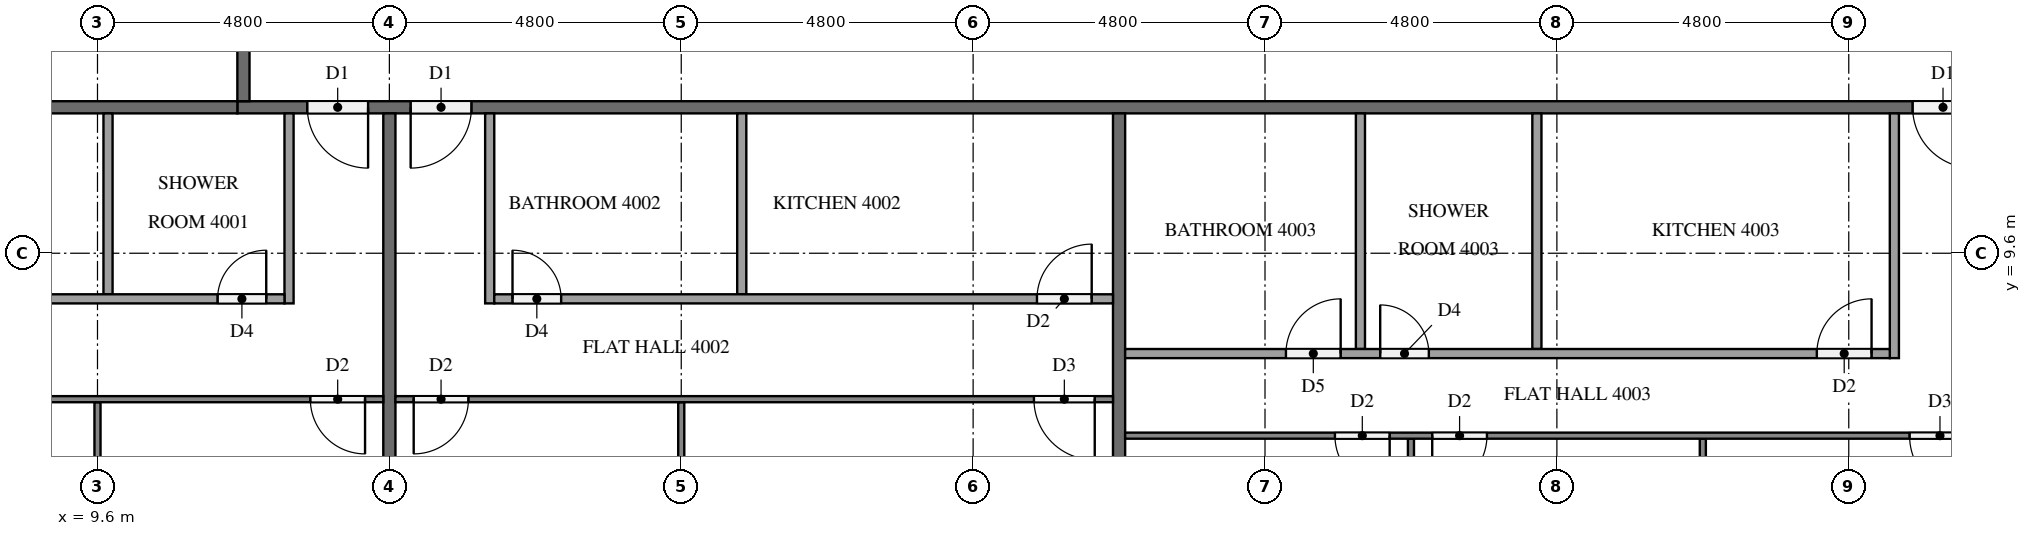
"""IFC4 building model, lengths in metres.
Left out: names, types, materials, properties, quantities, classifications, styles, units other than length and angle.
Written with IfcOpenShell. Run it as: python <this file> out.ifc"""

import sys

from ifc_helpers import new_model, si_unit, direction, frame, frame_2d, origin, place, context, subcontext, project, spatial, rectangle, extrude, element, fill, save


model = new_model("IFC4")
c1 = context("Model", 3, precision=1e-05, world=origin(), true_north=direction((0.0, 1.0)))
c2 = subcontext(c1, "Body", "Model", "MODEL_VIEW")
j1 = project(units=[si_unit("LENGTHUNIT", "METRE"), si_unit("PLANEANGLEUNIT", "RADIAN")], contexts=[c1])
p1 = place(None, origin())
s1 = spatial("IfcSite", under=j1, at=p1, CompositionType="ELEMENT")
p2 = place(p1, origin())
s2 = spatial("IfcBuilding", under=s1, at=p2, CompositionType="ELEMENT")
p3 = place(p2, frame((0.0, 0.0, 156.0)))
s3 = spatial("IfcBuildingStorey", under=s2, at=p3, CompositionType="ELEMENT", Elevation=156.0)
p4 = place(p3, frame((50.5, 12.0, 0.0), z_axis=(0.0, 0.0, 1.0), x_axis=(-1.0, 0.0, 0.0)))
e1 = element("IfcWall", 1, at=p4, inside=s3, PredefinedType="PARTITIONING", context=c2, shape_type="SweptSolid", body=[
    extrude(rectangle(XDim=38.6, YDim=0.2, at=frame_2d((19.3, 0.0))), origin(), (0.0, 0.0, 1.0), 3.2),
])
p5 = place(p4, frame((36.45, 0.0, 0.0)))
e2 = element("IfcOpeningElement", 2, at=p5, cuts=e1, PredefinedType="OPENING", context=c2, shape_type="SweptSolid", body=[
    extrude(rectangle(XDim=1.0, YDim=2.1, at=frame_2d((0.5, 1.05))), frame((0.0, 0.11, 0.0), z_axis=(0.0, -1.0, 0.0), x_axis=(1.0, 0.0, 0.0)), (0.0, 0.0, 1.0), 0.22),
])
p6 = place(p4, frame((34.75, 0.0, 0.0)))
e3 = element("IfcOpeningElement", 3, at=p6, cuts=e1, PredefinedType="OPENING", context=c2, shape_type="SweptSolid", body=[
    extrude(rectangle(XDim=1.0, YDim=2.1, at=frame_2d((0.5, 1.05))), frame((0.0, 0.11, 0.0), z_axis=(0.0, -1.0, 0.0), x_axis=(1.0, 0.0, 0.0)), (0.0, 0.0, 1.0), 0.22),
])
p7 = place(p4, frame((10.05, 0.0, 0.0)))
e4 = element("IfcOpeningElement", 4, at=p7, cuts=e1, PredefinedType="OPENING", context=c2, shape_type="SweptSolid", body=[
    extrude(rectangle(XDim=1.0, YDim=2.1, at=frame_2d((0.5, 1.05))), frame((0.0, 0.11, 0.0), z_axis=(0.0, -1.0, 0.0), x_axis=(1.0, 0.0, 0.0)), (0.0, 0.0, 1.0), 0.22),
])
p8 = place(p4, frame((8.35, 0.0, 0.0)))
e5 = element("IfcOpeningElement", 5, at=p8, cuts=e1, PredefinedType="OPENING", context=c2, shape_type="SweptSolid", body=[
    extrude(rectangle(XDim=1.0, YDim=2.1, at=frame_2d((0.5, 1.05))), frame((0.0, 0.11, 0.0), z_axis=(0.0, -1.0, 0.0), x_axis=(1.0, 0.0, 0.0)), (0.0, 0.0, 1.0), 0.22),
])
p9 = place(p3, frame((12.0, 12.1, 0.0), z_axis=(0.0, 0.0, 1.0), x_axis=(0.0, 1.0, 0.0)))
e6 = element("IfcWall", 6, at=p9, inside=s3, PredefinedType="PARTITIONING", context=c2, shape_type="SweptSolid", body=[
    extrude(rectangle(XDim=28.6, YDim=0.2, at=frame_2d((14.3, 0.0))), origin(), (0.0, 0.0, 1.0), 3.2),
])
p10 = place(p9, frame((27.35, 0.0, 0.0)))
e7 = element("IfcOpeningElement", 7, at=p10, cuts=e6, PredefinedType="OPENING", context=c2, shape_type="SweptSolid", body=[
    extrude(rectangle(XDim=1.0, YDim=2.1, at=frame_2d((0.5, 1.05))), frame((0.0, 0.11, 0.0), z_axis=(0.0, -1.0, 0.0), x_axis=(1.0, 0.0, 0.0)), (0.0, 0.0, 1.0), 0.22),
])
p11 = place(p9, frame((20.15, 0.0, 0.0)))
e8 = element("IfcOpeningElement", 8, at=p11, cuts=e6, PredefinedType="OPENING", context=c2, shape_type="SweptSolid", body=[
    extrude(rectangle(XDim=1.0, YDim=2.1, at=frame_2d((0.5, 1.05))), frame((0.0, 0.11, 0.0), z_axis=(0.0, -1.0, 0.0), x_axis=(1.0, 0.0, 0.0)), (0.0, 0.0, 1.0), 0.22),
])
p12 = place(p9, frame((10.55, 0.0, 0.0)))
e9 = element("IfcOpeningElement", 9, at=p12, cuts=e6, PredefinedType="OPENING", context=c2, shape_type="SweptSolid", body=[
    extrude(rectangle(XDim=1.0, YDim=2.1, at=frame_2d((0.5, 1.05))), frame((0.0, 0.11, 0.0), z_axis=(0.0, -1.0, 0.0), x_axis=(1.0, 0.0, 0.0)), (0.0, 0.0, 1.0), 0.22),
])
p13 = place(p3, frame((14.4, 11.9, 0.0), z_axis=(0.0, 0.0, 1.0), x_axis=(0.0, -1.0, 0.0)))
e10 = element("IfcWall", 10, at=p13, inside=s3, PredefinedType="PARTITIONING", context=c2, shape_type="SweptSolid", body=[
    extrude(rectangle(XDim=11.525, YDim=0.2, at=frame_2d((5.762, 0.0))), origin(), (0.0, 0.0, 1.0), 3.2),
])
for number, where, z_axis, x_axis in (
    (11, (0.1, 12.0, 0.0), (0.0, 0.0, 1.0), (1.0, 0.0, 0.0)),
    (12, (26.4, 11.9, 0.0), (0.0, 0.0, 1.0), (0.0, -1.0, 0.0)),
):
    element("IfcWall", number, at=place(p3, frame(where, z_axis=z_axis, x_axis=x_axis)), inside=s3, PredefinedType="PARTITIONING", context=c2, shape_type="SweptSolid", body=[
        extrude(rectangle(XDim=11.8, YDim=0.2, at=frame_2d((5.9, 0.0))), origin(), (0.0, 0.0, 1.0), 3.2),
    ])
p14 = place(p3, frame((9.6, 7.15, 0.0), z_axis=(0.0, 0.0, 1.0), x_axis=(0.0, -1.0, 0.0)))
e13 = element("IfcWall", 13, at=p14, inside=s3, PredefinedType="PARTITIONING", context=c2, shape_type="SweptSolid", body=[
    extrude(rectangle(XDim=7.05, YDim=0.1, at=frame_2d((3.525, 0.0))), origin(), (0.0, 0.0, 1.0), 3.2),
])
p15 = place(p3, frame((14.3, 7.2, 0.0), z_axis=(0.0, 0.0, 1.0), x_axis=(-1.0, 0.0, 0.0)))
e14 = element("IfcWall", 14, at=p15, inside=s3, PredefinedType="PARTITIONING", context=c2, shape_type="SweptSolid", body=[
    extrude(rectangle(XDim=14.2, YDim=0.1, at=frame_2d((7.1, 0.0))), origin(), (0.0, 0.0, 1.0), 3.2),
])
p16 = place(p15, frame((0.3, 0.0, 0.0)))
e15 = element("IfcOpeningElement", 15, at=p16, cuts=e14, PredefinedType="OPENING", context=c2, shape_type="SweptSolid", body=[
    extrude(rectangle(XDim=0.9, YDim=2.1, at=frame_2d((0.45, 1.05))), frame((0.0, 0.06, 0.0), z_axis=(0.0, -1.0, 0.0), x_axis=(1.0, 0.0, 0.0)), (0.0, 0.0, 1.0), 0.12),
])
p17 = place(p15, frame((8.25, 0.0, 0.0)))
e16 = element("IfcOpeningElement", 16, at=p17, cuts=e14, PredefinedType="OPENING", context=c2, shape_type="SweptSolid", body=[
    extrude(rectangle(XDim=0.9, YDim=2.1, at=frame_2d((0.45, 1.05))), frame((0.0, 0.06, 0.0), z_axis=(0.0, -1.0, 0.0), x_axis=(1.0, 0.0, 0.0)), (0.0, 0.0, 1.0), 0.12),
])
p18 = place(p15, frame((9.85, 0.0, 0.0)))
e17 = element("IfcOpeningElement", 17, at=p18, cuts=e14, PredefinedType="OPENING", context=c2, shape_type="SweptSolid", body=[
    extrude(rectangle(XDim=1.0, YDim=2.1, at=frame_2d((0.5, 1.05))), frame((0.0, 0.06, 0.0), z_axis=(0.0, -1.0, 0.0), x_axis=(1.0, 0.0, 0.0)), (0.0, 0.0, 1.0), 0.12),
])
p19 = place(p3, frame((9.773, 11.9, 0.0), z_axis=(0.0, 0.0, 1.0), x_axis=(0.0, -1.0, 0.0)))
e18 = element("IfcWall", 18, at=p19, inside=s3, PredefinedType="PARTITIONING", context=c2, shape_type="SweptSolid", body=[
    extrude(rectangle(XDim=2.975, YDim=0.15, at=frame_2d((1.487, 0.0))), origin(), (0.0, 0.0, 1.0), 3.2),
])
p20 = place(p3, frame((12.75, 11.9, 0.0), z_axis=(0.0, 0.0, 1.0), x_axis=(0.0, -1.0, 0.0)))
e19 = element("IfcWall", 19, at=p20, inside=s3, PredefinedType="PARTITIONING", context=c2, shape_type="SweptSolid", body=[
    extrude(rectangle(XDim=3.125, YDim=0.15, at=frame_2d((1.562, 0.0))), origin(), (0.0, 0.0, 1.0), 3.2),
])
p21 = place(p3, frame((0.1, 8.85, 0.0), z_axis=(0.0, 0.0, 1.0), x_axis=(1.0, 0.0, 0.0)))
e20 = element("IfcWall", 20, at=p21, inside=s3, PredefinedType="PARTITIONING", context=c2, shape_type="SweptSolid", body=[
    extrude(rectangle(XDim=12.575, YDim=0.15, at=frame_2d((6.288, 0.0))), origin(), (0.0, 0.0, 1.0), 3.2),
])
p22 = place(p21, frame((11.475, 0.0, 0.0)))
e21 = element("IfcOpeningElement", 21, at=p22, cuts=e20, PredefinedType="OPENING", context=c2, shape_type="SweptSolid", body=[
    extrude(rectangle(XDim=0.8, YDim=2.1, at=frame_2d((0.4, 1.05))), frame((0.0, 0.085, 0.0), z_axis=(0.0, -1.0, 0.0), x_axis=(1.0, 0.0, 0.0)), (0.0, 0.0, 1.0), 0.17),
])
p23 = place(p21, frame((4.194, 0.0, 0.0)))
e22 = element("IfcOpeningElement", 22, at=p23, cuts=e20, PredefinedType="OPENING", context=c2, shape_type="SweptSolid", body=[
    extrude(rectangle(XDim=0.9, YDim=2.1, at=frame_2d((0.45, 1.05))), frame((0.0, 0.085, 0.0), z_axis=(0.0, -1.0, 0.0), x_axis=(1.0, 0.0, 0.0)), (0.0, 0.0, 1.0), 0.17),
])
p24 = place(p21, frame((2.644, 0.0, 0.0)))
e23 = element("IfcOpeningElement", 23, at=p24, cuts=e20, PredefinedType="OPENING", context=c2, shape_type="SweptSolid", body=[
    extrude(rectangle(XDim=0.9, YDim=2.1, at=frame_2d((0.45, 1.05))), frame((0.0, 0.085, 0.0), z_axis=(0.0, -1.0, 0.0), x_axis=(1.0, 0.0, 0.0)), (0.0, 0.0, 1.0), 0.17),
])
p25 = place(p3, frame((19.2, 7.15, 0.0), z_axis=(0.0, 0.0, 1.0), x_axis=(0.0, -1.0, 0.0)))
e24 = element("IfcWall", 24, at=p25, inside=s3, PredefinedType="PARTITIONING", context=c2, shape_type="SweptSolid", body=[
    extrude(rectangle(XDim=7.05, YDim=0.1, at=frame_2d((3.525, 0.0))), origin(), (0.0, 0.0, 1.0), 3.2),
])
p26 = place(p3, frame((26.3, 7.2, 0.0), z_axis=(0.0, 0.0, 1.0), x_axis=(-1.0, 0.0, 0.0)))
e25 = element("IfcWall", 25, at=p26, inside=s3, PredefinedType="PARTITIONING", context=c2, shape_type="SweptSolid", body=[
    extrude(rectangle(XDim=11.8, YDim=0.1, at=frame_2d((5.9, 0.0))), origin(), (0.0, 0.0, 1.0), 3.2),
])
p27 = place(p26, frame((10.6, 0.0, 0.0)))
e26 = element("IfcOpeningElement", 26, at=p27, cuts=e25, PredefinedType="OPENING", context=c2, shape_type="SweptSolid", body=[
    extrude(rectangle(XDim=0.9, YDim=2.1, at=frame_2d((0.45, 1.05))), frame((0.0, 0.06, 0.0), z_axis=(0.0, -1.0, 0.0), x_axis=(1.0, 0.0, 0.0)), (0.0, 0.0, 1.0), 0.12),
])
p28 = place(p26, frame((0.3, 0.0, 0.0)))
e27 = element("IfcOpeningElement", 27, at=p28, cuts=e25, PredefinedType="OPENING", context=c2, shape_type="SweptSolid", body=[
    extrude(rectangle(XDim=1.0, YDim=2.1, at=frame_2d((0.5, 1.05))), frame((0.0, 0.06, 0.0), z_axis=(0.0, -1.0, 0.0), x_axis=(1.0, 0.0, 0.0)), (0.0, 0.0, 1.0), 0.12),
])
p29 = place(p3, frame((20.195, 11.9, 0.0), z_axis=(0.0, 0.0, 1.0), x_axis=(0.0, -1.0, 0.0)))
e28 = element("IfcWall", 28, at=p29, inside=s3, PredefinedType="PARTITIONING", context=c2, shape_type="SweptSolid", body=[
    extrude(rectangle(XDim=2.975, YDim=0.15, at=frame_2d((1.487, 0.0))), origin(), (0.0, 0.0, 1.0), 3.2),
])
p30 = place(p3, frame((16.05, 11.9, 0.0), z_axis=(0.0, 0.0, 1.0), x_axis=(0.0, -1.0, 0.0)))
e29 = element("IfcWall", 29, at=p30, inside=s3, PredefinedType="PARTITIONING", context=c2, shape_type="SweptSolid", body=[
    extrude(rectangle(XDim=3.125, YDim=0.15, at=frame_2d((1.562, 0.0))), origin(), (0.0, 0.0, 1.0), 3.2),
])
p31 = place(p3, frame((16.125, 8.85, 0.0), z_axis=(0.0, 0.0, 1.0), x_axis=(1.0, 0.0, 0.0)))
e30 = element("IfcWall", 30, at=p31, inside=s3, PredefinedType="PARTITIONING", context=c2, shape_type="SweptSolid", body=[
    extrude(rectangle(XDim=10.175, YDim=0.15, at=frame_2d((5.087, 0.0))), origin(), (0.0, 0.0, 1.0), 3.2),
])
p32 = place(p31, frame((0.3, 0.0, 0.0)))
e31 = element("IfcOpeningElement", 31, at=p32, cuts=e30, PredefinedType="OPENING", context=c2, shape_type="SweptSolid", body=[
    extrude(rectangle(XDim=0.8, YDim=2.1, at=frame_2d((0.4, 1.05))), frame((0.0, 0.085, 0.0), z_axis=(0.0, -1.0, 0.0), x_axis=(1.0, 0.0, 0.0)), (0.0, 0.0, 1.0), 0.17),
])
p33 = place(p31, frame((8.925, 0.0, 0.0)))
e32 = element("IfcOpeningElement", 32, at=p33, cuts=e30, PredefinedType="OPENING", context=c2, shape_type="SweptSolid", body=[
    extrude(rectangle(XDim=0.9, YDim=2.1, at=frame_2d((0.45, 1.05))), frame((0.0, 0.085, 0.0), z_axis=(0.0, -1.0, 0.0), x_axis=(1.0, 0.0, 0.0)), (0.0, 0.0, 1.0), 0.17),
])
for number, where, z_axis, x_axis in (
    (33, (36.0, 6.55, 0.0), (0.0, 0.0, 1.0), (0.0, -1.0, 0.0)),
    (34, (31.2, 6.55, 0.0), (0.0, 0.0, 1.0), (0.0, -1.0, 0.0)),
):
    element("IfcWall", number, at=place(p3, frame(where, z_axis=z_axis, x_axis=x_axis)), inside=s3, PredefinedType="PARTITIONING", context=c2, shape_type="SweptSolid", body=[
        extrude(rectangle(XDim=6.45, YDim=0.1, at=frame_2d((3.225, 0.0))), origin(), (0.0, 0.0, 1.0), 3.2),
    ])
p34 = place(p3, frame((40.7, 6.6, 0.0), z_axis=(0.0, 0.0, 1.0), x_axis=(-1.0, 0.0, 0.0)))
e35 = element("IfcWall", 35, at=p34, inside=s3, PredefinedType="PARTITIONING", context=c2, shape_type="SweptSolid", body=[
    extrude(rectangle(XDim=14.2, YDim=0.1, at=frame_2d((7.1, 0.0))), origin(), (0.0, 0.0, 1.0), 3.2),
])
p35 = place(p34, frame((0.3, 0.0, 0.0)))
e36 = element("IfcOpeningElement", 36, at=p35, cuts=e35, PredefinedType="OPENING", context=c2, shape_type="SweptSolid", body=[
    extrude(rectangle(XDim=1.0, YDim=2.1, at=frame_2d((0.5, 1.05))), frame((0.0, 0.06, 0.0), z_axis=(0.0, -1.0, 0.0), x_axis=(1.0, 0.0, 0.0)), (0.0, 0.0, 1.0), 0.12),
])
p36 = place(p34, frame((8.25, 0.0, 0.0)))
e37 = element("IfcOpeningElement", 37, at=p36, cuts=e35, PredefinedType="OPENING", context=c2, shape_type="SweptSolid", body=[
    extrude(rectangle(XDim=0.9, YDim=2.1, at=frame_2d((0.45, 1.05))), frame((0.0, 0.06, 0.0), z_axis=(0.0, -1.0, 0.0), x_axis=(1.0, 0.0, 0.0)), (0.0, 0.0, 1.0), 0.12),
])
p37 = place(p34, frame((9.85, 0.0, 0.0)))
e38 = element("IfcOpeningElement", 38, at=p37, cuts=e35, PredefinedType="OPENING", context=c2, shape_type="SweptSolid", body=[
    extrude(rectangle(XDim=0.9, YDim=2.1, at=frame_2d((0.45, 1.05))), frame((0.0, 0.06, 0.0), z_axis=(0.0, -1.0, 0.0), x_axis=(1.0, 0.0, 0.0)), (0.0, 0.0, 1.0), 0.12),
])
for number, where, z_axis, x_axis in (
    (39, (33.271, 11.9, 0.0), (0.0, 0.0, 1.0), (0.0, -1.0, 0.0)),
    (40, (30.369, 11.9, 0.0), (0.0, 0.0, 1.0), (0.0, -1.0, 0.0)),
):
    element("IfcWall", number, at=place(p3, frame(where, z_axis=z_axis, x_axis=x_axis)), inside=s3, PredefinedType="PARTITIONING", context=c2, shape_type="SweptSolid", body=[
        extrude(rectangle(XDim=3.875, YDim=0.15, at=frame_2d((1.938, 0.0))), origin(), (0.0, 0.0, 1.0), 3.2),
    ])
p38 = place(p3, frame((39.15, 11.9, 0.0), z_axis=(0.0, 0.0, 1.0), x_axis=(0.0, -1.0, 0.0)))
e41 = element("IfcWall", 41, at=p38, inside=s3, PredefinedType="PARTITIONING", context=c2, shape_type="SweptSolid", body=[
    extrude(rectangle(XDim=4.025, YDim=0.15, at=frame_2d((2.012, 0.0))), origin(), (0.0, 0.0, 1.0), 3.2),
])
p39 = place(p3, frame((26.5, 7.95, 0.0), z_axis=(0.0, 0.0, 1.0), x_axis=(1.0, 0.0, 0.0)))
e42 = element("IfcWall", 42, at=p39, inside=s3, PredefinedType="PARTITIONING", context=c2, shape_type="SweptSolid", body=[
    extrude(rectangle(XDim=12.575, YDim=0.15, at=frame_2d((6.288, 0.0))), origin(), (0.0, 0.0, 1.0), 3.2),
])
p40 = place(p39, frame((11.375, 0.0, 0.0)))
e43 = element("IfcOpeningElement", 43, at=p40, cuts=e42, PredefinedType="OPENING", context=c2, shape_type="SweptSolid", body=[
    extrude(rectangle(XDim=0.9, YDim=2.1, at=frame_2d((0.45, 1.05))), frame((0.0, 0.085, 0.0), z_axis=(0.0, -1.0, 0.0), x_axis=(1.0, 0.0, 0.0)), (0.0, 0.0, 1.0), 0.17),
])
p41 = place(p39, frame((4.194, 0.0, 0.0)))
e44 = element("IfcOpeningElement", 44, at=p41, cuts=e42, PredefinedType="OPENING", context=c2, shape_type="SweptSolid", body=[
    extrude(rectangle(XDim=0.8, YDim=2.1, at=frame_2d((0.4, 1.05))), frame((0.0, 0.085, 0.0), z_axis=(0.0, -1.0, 0.0), x_axis=(1.0, 0.0, 0.0)), (0.0, 0.0, 1.0), 0.17),
])
p42 = place(p39, frame((2.644, 0.0, 0.0)))
e45 = element("IfcOpeningElement", 45, at=p42, cuts=e42, PredefinedType="OPENING", context=c2, shape_type="SweptSolid", body=[
    extrude(rectangle(XDim=0.9, YDim=2.1, at=frame_2d((0.45, 1.05))), frame((0.0, 0.085, 0.0), z_axis=(0.0, -1.0, 0.0), x_axis=(1.0, 0.0, 0.0)), (0.0, 0.0, 1.0), 0.17),
])
p43 = place(p5, origin())
e46 = element("IfcDoor", 46, at=p43, inside=s3, OperationType="SINGLE_SWING_LEFT", PredefinedType="DOOR", context=c2, shape_type="SweptSolid", body=[
    extrude(rectangle(XDim=1.0, YDim=2.1, at=frame_2d((0.5, 1.05))), frame((0.0, 0.025, 0.0), z_axis=(0.0, -1.0, 0.0), x_axis=(1.0, 0.0, 0.0)), (0.0, 0.0, 1.0), 0.05),
])
fill(e2, e46)
p44 = place(p6, origin())
e47 = element("IfcDoor", 47, at=p44, inside=s3, OperationType="SINGLE_SWING_RIGHT", PredefinedType="DOOR", context=c2, shape_type="SweptSolid", body=[
    extrude(rectangle(XDim=1.0, YDim=2.1, at=frame_2d((0.5, 1.05))), frame((0.0, 0.025, 0.0), z_axis=(0.0, -1.0, 0.0), x_axis=(1.0, 0.0, 0.0)), (0.0, 0.0, 1.0), 0.05),
])
fill(e3, e47)
p45 = place(p7, origin())
e48 = element("IfcDoor", 48, at=p45, inside=s3, OperationType="SINGLE_SWING_LEFT", PredefinedType="DOOR", context=c2, shape_type="SweptSolid", body=[
    extrude(rectangle(XDim=1.0, YDim=2.1, at=frame_2d((0.5, 1.05))), frame((0.0, 0.025, 0.0), z_axis=(0.0, -1.0, 0.0), x_axis=(1.0, 0.0, 0.0)), (0.0, 0.0, 1.0), 0.05),
])
fill(e4, e48)
p46 = place(p16, origin())
e49 = element("IfcDoor", 49, at=p46, inside=s3, OperationType="SINGLE_SWING_LEFT", PredefinedType="DOOR", context=c2, shape_type="SweptSolid", body=[
    extrude(rectangle(XDim=0.9, YDim=2.1, at=frame_2d((0.45, 1.05))), frame((0.0, 0.025, 0.0), z_axis=(0.0, -1.0, 0.0), x_axis=(1.0, 0.0, 0.0)), (0.0, 0.0, 1.0), 0.05),
])
fill(e15, e49)
p47 = place(p22, origin())
e50 = element("IfcDoor", 50, at=p47, inside=s3, OperationType="SINGLE_SWING_RIGHT", PredefinedType="DOOR", context=c2, shape_type="SweptSolid", body=[
    extrude(rectangle(XDim=0.8, YDim=2.1, at=frame_2d((0.4, 1.05))), frame((0.0, 0.025, 0.0), z_axis=(0.0, -1.0, 0.0), x_axis=(1.0, 0.0, 0.0)), (0.0, 0.0, 1.0), 0.05),
])
fill(e21, e50)
p48 = place(p27, origin())
e51 = element("IfcDoor", 51, at=p48, inside=s3, OperationType="SINGLE_SWING_RIGHT", PredefinedType="DOOR", context=c2, shape_type="SweptSolid", body=[
    extrude(rectangle(XDim=0.9, YDim=2.1, at=frame_2d((0.45, 1.05))), frame((0.0, 0.025, 0.0), z_axis=(0.0, -1.0, 0.0), x_axis=(1.0, 0.0, 0.0)), (0.0, 0.0, 1.0), 0.05),
])
fill(e26, e51)
p49 = place(p28, origin())
e52 = element("IfcDoor", 52, at=p49, inside=s3, OperationType="SINGLE_SWING_LEFT", PredefinedType="DOOR", context=c2, shape_type="SweptSolid", body=[
    extrude(rectangle(XDim=1.0, YDim=2.1, at=frame_2d((0.5, 1.05))), frame((0.0, 0.025, 0.0), z_axis=(0.0, -1.0, 0.0), x_axis=(1.0, 0.0, 0.0)), (0.0, 0.0, 1.0), 0.05),
])
fill(e27, e52)
p50 = place(p32, origin())
e53 = element("IfcDoor", 53, at=p50, inside=s3, OperationType="SINGLE_SWING_LEFT", PredefinedType="DOOR", context=c2, shape_type="SweptSolid", body=[
    extrude(rectangle(XDim=0.8, YDim=2.1, at=frame_2d((0.4, 1.05))), frame((0.0, 0.025, 0.0), z_axis=(0.0, -1.0, 0.0), x_axis=(1.0, 0.0, 0.0)), (0.0, 0.0, 1.0), 0.05),
])
fill(e31, e53)
p51 = place(p33, origin())
e54 = element("IfcDoor", 54, at=p51, inside=s3, OperationType="SINGLE_SWING_RIGHT", PredefinedType="DOOR", context=c2, shape_type="SweptSolid", body=[
    extrude(rectangle(XDim=0.9, YDim=2.1, at=frame_2d((0.45, 1.05))), frame((0.0, 0.025, 0.0), z_axis=(0.0, -1.0, 0.0), x_axis=(1.0, 0.0, 0.0)), (0.0, 0.0, 1.0), 0.05),
])
fill(e32, e54)
p52 = place(p35, origin())
e55 = element("IfcDoor", 55, at=p52, inside=s3, OperationType="SINGLE_SWING_LEFT", PredefinedType="DOOR", context=c2, shape_type="SweptSolid", body=[
    extrude(rectangle(XDim=1.0, YDim=2.1, at=frame_2d((0.5, 1.05))), frame((0.0, 0.025, 0.0), z_axis=(0.0, -1.0, 0.0), x_axis=(1.0, 0.0, 0.0)), (0.0, 0.0, 1.0), 0.05),
])
fill(e36, e55)
p53 = place(p36, origin())
e56 = element("IfcDoor", 56, at=p53, inside=s3, OperationType="SINGLE_SWING_RIGHT", PredefinedType="DOOR", context=c2, shape_type="SweptSolid", body=[
    extrude(rectangle(XDim=0.9, YDim=2.1, at=frame_2d((0.45, 1.05))), frame((0.0, 0.025, 0.0), z_axis=(0.0, -1.0, 0.0), x_axis=(1.0, 0.0, 0.0)), (0.0, 0.0, 1.0), 0.05),
])
fill(e37, e56)
p54 = place(p37, origin())
e57 = element("IfcDoor", 57, at=p54, inside=s3, OperationType="SINGLE_SWING_LEFT", PredefinedType="DOOR", context=c2, shape_type="SweptSolid", body=[
    extrude(rectangle(XDim=0.9, YDim=2.1, at=frame_2d((0.45, 1.05))), frame((0.0, 0.025, 0.0), z_axis=(0.0, -1.0, 0.0), x_axis=(1.0, 0.0, 0.0)), (0.0, 0.0, 1.0), 0.05),
])
fill(e38, e57)
p55 = place(p40, origin())
e58 = element("IfcDoor", 58, at=p55, inside=s3, OperationType="SINGLE_SWING_RIGHT", PredefinedType="DOOR", context=c2, shape_type="SweptSolid", body=[
    extrude(rectangle(XDim=0.9, YDim=2.1, at=frame_2d((0.45, 1.05))), frame((0.0, 0.025, 0.0), z_axis=(0.0, -1.0, 0.0), x_axis=(1.0, 0.0, 0.0)), (0.0, 0.0, 1.0), 0.05),
])
fill(e43, e58)
p56 = place(p41, origin())
e59 = element("IfcDoor", 59, at=p56, inside=s3, OperationType="SINGLE_SWING_LEFT", PredefinedType="DOOR", context=c2, shape_type="SweptSolid", body=[
    extrude(rectangle(XDim=0.8, YDim=2.1, at=frame_2d((0.4, 1.05))), frame((0.0, 0.025, 0.0), z_axis=(0.0, -1.0, 0.0), x_axis=(1.0, 0.0, 0.0)), (0.0, 0.0, 1.0), 0.05),
])
fill(e44, e59)
p57 = place(p42, origin())
e60 = element("IfcDoor", 60, at=p57, inside=s3, OperationType="SINGLE_SWING_RIGHT", PredefinedType="DOOR", context=c2, shape_type="SweptSolid", body=[
    extrude(rectangle(XDim=0.9, YDim=2.1, at=frame_2d((0.45, 1.05))), frame((0.0, 0.025, 0.0), z_axis=(0.0, -1.0, 0.0), x_axis=(1.0, 0.0, 0.0)), (0.0, 0.0, 1.0), 0.05),
])
fill(e45, e60)
save(model, sys.argv[1])
